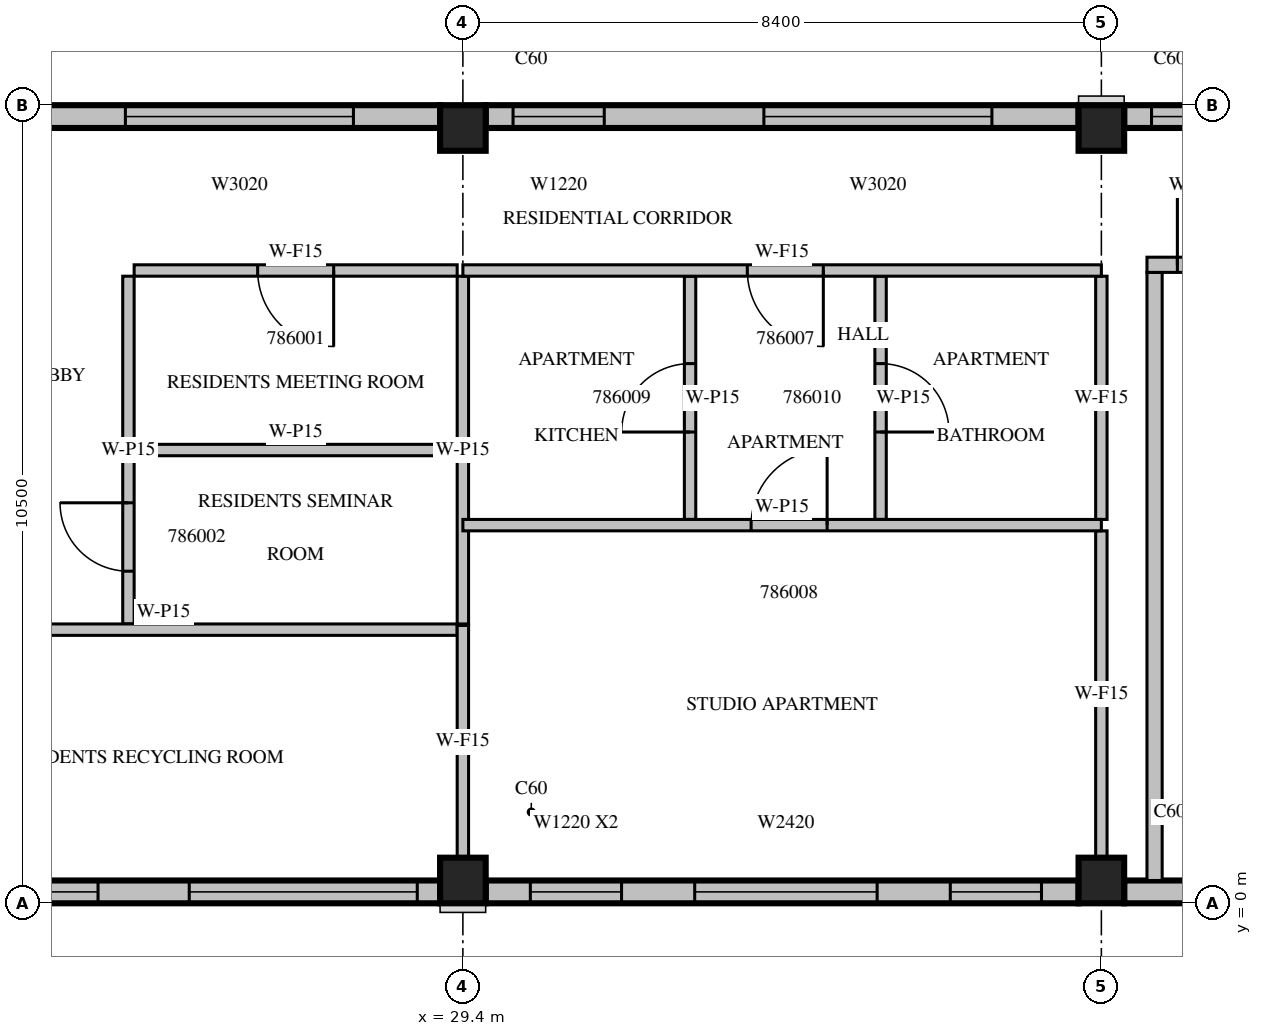
"""IFC4 building model, lengths in metres.
Left out: names, types, materials, properties, quantities, classifications, styles, units other than length and angle.
Written with IfcOpenShell. Run it as: python <this file> out.ifc"""

import sys

from ifc_helpers import new_model, si_unit, direction, frame, frame_2d, origin, origin_2d, place, context, subcontext, project, spatial, rectangle, extrude, source, transform, mapped, element, fill, save


model = new_model("IFC4")
c1 = context("Model", 3, precision=1e-05, world=origin(), true_north=direction((0.0, 1.0)))
c2 = subcontext(c1, "Body", "Model", "MODEL_VIEW")
j1 = project(units=[si_unit("LENGTHUNIT", "METRE"), si_unit("PLANEANGLEUNIT", "RADIAN")], contexts=[c1])
p1 = place(None, origin())
s1 = spatial("IfcSite", under=j1, at=p1, CompositionType="ELEMENT")
p2 = place(p1, origin())
s2 = spatial("IfcBuilding", under=s1, at=p2, CompositionType="ELEMENT")
p3 = place(p2, frame((0.0, 0.0, 361.5)))
s3 = spatial("IfcBuildingStorey", under=s2, at=p3, CompositionType="ELEMENT", Elevation=361.5)
m1 = source(origin(), c2, "Body", "SweptSolid", [
    extrude(rectangle(XDim=0.6, YDim=0.6, at=origin_2d()), origin(), (0.0, 0.0, 1.0), 3.5),
])
for number, where, z_axis, x_axis in (
    (1, (29.4, 0.3, 0.0), (0.0, 0.0, 1.0), (1.0, 0.0, 0.0)),
    (2, (37.8, 0.3, 0.0), (0.0, 0.0, 1.0), (1.0, 0.0, 0.0)),
    (3, (29.4, 10.2, 0.0), (0.0, 0.0, 1.0), (1.0, 0.0, 0.0)),
    (4, (37.8, 10.2, 0.0), (0.0, 0.0, 1.0), (1.0, 0.0, 0.0)),
):
    element("IfcColumn", number, at=place(p3, frame(where, z_axis=z_axis, x_axis=x_axis)), inside=s3, PredefinedType="COLUMN", context=c2, shape_type="MappedRepresentation", body=[
        mapped(m1, transform((0.0, 0.0, 0.0), scale=1.0)),
    ])
m2 = source(origin(), c2, "Body", "SweptSolid", [
    extrude(rectangle(XDim=7.8, YDim=0.3, at=frame_2d((3.9, 0.0))), origin(), (0.0, 0.0, 1.0), 3.1),
])
p4 = place(p3, frame((21.3, 0.15, 0.0), z_axis=(0.0, 0.0, 1.0), x_axis=(1.0, 0.0, 0.0)))
e5 = element("IfcWall", 5, at=p4, inside=s3, PredefinedType="STANDARD", context=c2, shape_type="MappedRepresentation", body=[
    mapped(m2, transform((0.0, 0.0, 0.0), scale=1.0)),
])
m3 = source(origin(), c2, "Body", "SweptSolid", [
    extrude(rectangle(XDim=3.0, YDim=2.0, at=frame_2d((1.5, 1.0))), frame((0.0, 0.16, 0.0), z_axis=(0.0, -1.0, 0.0), x_axis=(1.0, 0.0, 0.0)), (0.0, 0.0, 1.0), 0.32),
])
p5 = place(p4, frame((0.3, 0.0, 0.6)))
e6 = element("IfcOpeningElement", 6, at=p5, cuts=e5, PredefinedType="OPENING", context=c2, shape_type="MappedRepresentation", body=[
    mapped(m3, transform((0.0, 0.0, 0.0), scale=1.0)),
])
p6 = place(p4, frame((4.5, 0.0, 0.6)))
e7 = element("IfcOpeningElement", 7, at=p6, cuts=e5, PredefinedType="OPENING", context=c2, shape_type="MappedRepresentation", body=[
    mapped(m3, transform((0.0, 0.0, 0.0), scale=1.0)),
])
p7 = place(p3, frame((29.7, 0.15, 0.0), z_axis=(0.0, 0.0, 1.0), x_axis=(1.0, 0.0, 0.0)))
e8 = element("IfcWall", 8, at=p7, inside=s3, PredefinedType="STANDARD", context=c2, shape_type="MappedRepresentation", body=[
    mapped(m2, transform((0.0, 0.0, 0.0), scale=1.0)),
])
m4 = source(origin(), c2, "Body", "SweptSolid", [
    extrude(rectangle(XDim=1.2, YDim=2.0, at=frame_2d((0.6, 1.0))), frame((0.0, 0.16, 0.0), z_axis=(0.0, -1.0, 0.0), x_axis=(1.0, 0.0, 0.0)), (0.0, 0.0, 1.0), 0.32),
])
p8 = place(p7, frame((0.588, 0.0, 0.6)))
e9 = element("IfcOpeningElement", 9, at=p8, cuts=e8, PredefinedType="OPENING", context=c2, shape_type="MappedRepresentation", body=[
    mapped(m4, transform((0.0, 0.0, 0.0), scale=1.0)),
])
p9 = place(p7, frame((6.112, 0.0, 0.6)))
e10 = element("IfcOpeningElement", 10, at=p9, cuts=e8, PredefinedType="OPENING", context=c2, shape_type="MappedRepresentation", body=[
    mapped(m4, transform((0.0, 0.0, 0.0), scale=1.0)),
])
m5 = source(origin(), c2, "Body", "SweptSolid", [
    extrude(rectangle(XDim=2.4, YDim=2.0, at=frame_2d((1.2, 1.0))), frame((0.0, 0.16, 0.0), z_axis=(0.0, -1.0, 0.0), x_axis=(1.0, 0.0, 0.0)), (0.0, 0.0, 1.0), 0.32),
])
p10 = place(p7, frame((2.75, 0.0, 0.6)))
e11 = element("IfcOpeningElement", 11, at=p10, cuts=e8, PredefinedType="OPENING", context=c2, shape_type="MappedRepresentation", body=[
    mapped(m5, transform((0.0, 0.0, 0.0), scale=1.0)),
])
m6 = source(origin(), c2, "Body", "SweptSolid", [
    extrude(rectangle(XDim=2.1, YDim=0.3, at=frame_2d((1.05, 0.0))), origin(), (0.0, 0.0, 1.0), 3.1),
])
p11 = place(p3, frame((38.1, 0.15, 0.0), z_axis=(0.0, 0.0, 1.0), x_axis=(1.0, 0.0, 0.0)))
e12 = element("IfcWall", 12, at=p11, inside=s3, PredefinedType="STANDARD", context=c2, shape_type="MappedRepresentation", body=[
    mapped(m6, transform((0.0, 0.0, 0.0), scale=1.0)),
])
p12 = place(p3, frame((45.9, 10.35, 0.0), z_axis=(0.0, 0.0, 1.0), x_axis=(-1.0, 0.0, 0.0)))
e13 = element("IfcWall", 13, at=p12, inside=s3, PredefinedType="STANDARD", context=c2, shape_type="MappedRepresentation", body=[
    mapped(m2, transform((0.0, 0.0, 0.0), scale=1.0)),
])
p13 = place(p12, frame((1.14, 0.0, 0.6)))
e14 = element("IfcOpeningElement", 14, at=p13, cuts=e13, PredefinedType="OPENING", context=c2, shape_type="MappedRepresentation", body=[
    mapped(m3, transform((0.0, 0.0, 0.0), scale=1.0)),
])
p14 = place(p12, frame((6.24, 0.0, 0.6)))
e15 = element("IfcOpeningElement", 15, at=p14, cuts=e13, PredefinedType="OPENING", context=c2, shape_type="MappedRepresentation", body=[
    mapped(m4, transform((0.0, 0.0, 0.0), scale=1.0)),
])
p15 = place(p3, frame((37.5, 10.35, 0.0), z_axis=(0.0, 0.0, 1.0), x_axis=(-1.0, 0.0, 0.0)))
e16 = element("IfcWall", 16, at=p15, inside=s3, PredefinedType="STANDARD", context=c2, shape_type="MappedRepresentation", body=[
    mapped(m2, transform((0.0, 0.0, 0.0), scale=1.0)),
])
p16 = place(p15, frame((1.14, 0.0, 0.6)))
e17 = element("IfcOpeningElement", 17, at=p16, cuts=e16, PredefinedType="OPENING", context=c2, shape_type="MappedRepresentation", body=[
    mapped(m3, transform((0.0, 0.0, 0.0), scale=1.0)),
])
p17 = place(p15, frame((6.24, 0.0, 0.6)))
e18 = element("IfcOpeningElement", 18, at=p17, cuts=e16, PredefinedType="OPENING", context=c2, shape_type="MappedRepresentation", body=[
    mapped(m4, transform((0.0, 0.0, 0.0), scale=1.0)),
])
m7 = source(origin(), c2, "Body", "SweptSolid", [
    extrude(rectangle(XDim=7.5, YDim=0.3, at=frame_2d((3.75, 0.0))), origin(), (0.0, 0.0, 1.0), 3.1),
])
p18 = place(p3, frame((29.1, 10.35, 0.0), z_axis=(0.0, 0.0, 1.0), x_axis=(-1.0, 0.0, 0.0)))
e19 = element("IfcWall", 19, at=p18, inside=s3, PredefinedType="STANDARD", context=c2, shape_type="MappedRepresentation", body=[
    mapped(m7, transform((0.0, 0.0, 0.0), scale=1.0)),
])
p19 = place(p18, frame((1.14, 0.0, 0.6)))
e20 = element("IfcOpeningElement", 20, at=p19, cuts=e19, PredefinedType="OPENING", context=c2, shape_type="MappedRepresentation", body=[
    mapped(m3, transform((0.0, 0.0, 0.0), scale=1.0)),
])
m8 = source(origin(), c2, "Body", "SweptSolid", [
    extrude(rectangle(XDim=1.8, YDim=2.0, at=frame_2d((0.9, 1.0))), frame((0.0, 0.16, 0.0), z_axis=(0.0, -1.0, 0.0), x_axis=(1.0, 0.0, 0.0)), (0.0, 0.0, 1.0), 0.32),
])
p20 = place(p18, frame((5.52, 0.0, 0.6)))
e21 = element("IfcOpeningElement", 21, at=p20, cuts=e19, PredefinedType="OPENING", context=c2, shape_type="MappedRepresentation", body=[
    mapped(m8, transform((0.0, 0.0, 0.0), scale=1.0)),
])
m9 = source(origin(), c2, "Body", "SweptSolid", [
    extrude(rectangle(XDim=8.0, YDim=0.2, at=frame_2d((4.0, 0.0))), origin(), (0.0, 0.0, 1.0), 3.1),
])
p21 = place(p3, frame((38.5, 0.3, 0.0), z_axis=(0.0, 0.0, 1.0), x_axis=(0.0, 1.0, 0.0)))
e22 = element("IfcWall", 22, at=p21, inside=s3, PredefinedType="PARTITIONING", context=c2, shape_type="MappedRepresentation", body=[
    mapped(m9, transform((0.0, 0.0, 0.0), scale=1.0)),
])
m10 = source(origin(), c2, "Body", "SweptSolid", [
    extrude(rectangle(XDim=5.45, YDim=0.2, at=frame_2d((2.725, 0.0))), origin(), (0.0, 0.0, 1.0), 3.1),
])
p22 = place(p3, frame((38.4, 8.4, 0.0), z_axis=(0.0, 0.0, 1.0), x_axis=(1.0, 0.0, 0.0)))
e23 = element("IfcWall", 23, at=p22, inside=s3, PredefinedType="PARTITIONING", context=c2, shape_type="MappedRepresentation", body=[
    mapped(m10, transform((0.0, 0.0, 0.0), scale=1.0)),
])
m11 = source(origin(), c2, "Body", "SweptSolid", [
    extrude(rectangle(XDim=1.2, YDim=2.1, at=frame_2d((0.6, 1.05))), frame((0.0, 0.11, 0.0), z_axis=(0.0, -1.0, 0.0), x_axis=(1.0, 0.0, 0.0)), (0.0, 0.0, 1.0), 0.22),
])
p23 = place(p22, frame((0.4, 0.0, 0.0)))
e24 = element("IfcOpeningElement", 24, at=p23, cuts=e23, PredefinedType="OPENING", context=c2, shape_type="MappedRepresentation", body=[
    mapped(m11, transform((0.0, 0.0, 0.0), scale=1.0)),
])
m12 = source(origin(), c2, "Body", "SweptSolid", [
    extrude(rectangle(XDim=0.9, YDim=2.1, at=frame_2d((0.45, 1.05))), frame((0.0, 0.11, 0.0), z_axis=(0.0, -1.0, 0.0), x_axis=(1.0, 0.0, 0.0)), (0.0, 0.0, 1.0), 0.22),
])
p24 = place(p22, frame((3.25, 0.0, 0.0)))
e25 = element("IfcOpeningElement", 25, at=p24, cuts=e23, PredefinedType="OPENING", context=c2, shape_type="MappedRepresentation", body=[
    mapped(m12, transform((0.0, 0.0, 0.0), scale=1.0)),
])
m13 = source(origin(), c2, "Body", "SweptSolid", [
    extrude(rectangle(XDim=4.575, YDim=0.15, at=frame_2d((2.288, 0.0))), origin(), (0.0, 0.0, 1.0), 3.1),
])
p25 = place(p3, frame((25.0, 8.25, 0.0), z_axis=(0.0, 0.0, 1.0), x_axis=(0.0, -1.0, 0.0)))
e26 = element("IfcWall", 26, at=p25, inside=s3, PredefinedType="PARTITIONING", context=c2, shape_type="MappedRepresentation", body=[
    mapped(m13, transform((0.0, 0.0, 0.0), scale=1.0)),
])
m14 = source(origin(), c2, "Body", "SweptSolid", [
    extrude(rectangle(XDim=0.9, YDim=2.1, at=frame_2d((0.45, 1.05))), frame((0.0, 0.085, 0.0), z_axis=(0.0, -1.0, 0.0), x_axis=(1.0, 0.0, 0.0)), (0.0, 0.0, 1.0), 0.17),
])
p26 = place(p25, frame((2.981, 0.0, 0.0)))
e27 = element("IfcOpeningElement", 27, at=p26, cuts=e26, PredefinedType="OPENING", context=c2, shape_type="MappedRepresentation", body=[
    mapped(m14, transform((0.0, 0.0, 0.0), scale=1.0)),
])
p27 = place(p3, frame((29.4, 3.675, 0.0), z_axis=(0.0, 0.0, 1.0), x_axis=(0.0, 1.0, 0.0)))
e28 = element("IfcWall", 28, at=p27, inside=s3, PredefinedType="PARTITIONING", context=c2, shape_type="MappedRepresentation", body=[
    mapped(m13, transform((0.0, 0.0, 0.0), scale=1.0)),
])
m15 = source(origin(), c2, "Body", "SweptSolid", [
    extrude(rectangle(XDim=4.25, YDim=0.15, at=frame_2d((2.125, 0.0))), origin(), (0.0, 0.0, 1.0), 3.1),
])
p28 = place(p3, frame((29.325, 8.325, 0.0), z_axis=(0.0, 0.0, 1.0), x_axis=(-1.0, 0.0, 0.0)))
e29 = element("IfcWall", 29, at=p28, inside=s3, PredefinedType="PARTITIONING", context=c2, shape_type="MappedRepresentation", body=[
    mapped(m15, transform((0.0, 0.0, 0.0), scale=1.0)),
])
m16 = source(origin(), c2, "Body", "SweptSolid", [
    extrude(rectangle(XDim=1.0, YDim=2.1, at=frame_2d((0.5, 1.05))), frame((0.0, 0.085, 0.0), z_axis=(0.0, -1.0, 0.0), x_axis=(1.0, 0.0, 0.0)), (0.0, 0.0, 1.0), 0.17),
])
p29 = place(p28, frame((1.625, 0.0, 0.0)))
e30 = element("IfcOpeningElement", 30, at=p29, cuts=e29, PredefinedType="OPENING", context=c2, shape_type="MappedRepresentation", body=[
    mapped(m16, transform((0.0, 0.0, 0.0), scale=1.0)),
])
p30 = place(p3, frame((29.325, 5.963, 0.0), z_axis=(0.0, 0.0, 1.0), x_axis=(-1.0, 0.0, 0.0)))
e31 = element("IfcWall", 31, at=p30, inside=s3, PredefinedType="PARTITIONING", context=c2, shape_type="MappedRepresentation", body=[
    mapped(m15, transform((0.0, 0.0, 0.0), scale=1.0)),
])
m17 = source(origin(), c2, "Body", "SweptSolid", [
    extrude(rectangle(XDim=7.725, YDim=0.15, at=frame_2d((3.862, 0.0))), origin(), (0.0, 0.0, 1.0), 3.1),
])
p31 = place(p3, frame((21.6, 3.6, 0.0), z_axis=(0.0, 0.0, 1.0), x_axis=(1.0, 0.0, 0.0)))
e32 = element("IfcWall", 32, at=p31, inside=s3, PredefinedType="PARTITIONING", context=c2, shape_type="MappedRepresentation", body=[
    mapped(m17, transform((0.0, 0.0, 0.0), scale=1.0)),
])
m18 = source(origin(), c2, "Body", "SweptSolid", [
    extrude(rectangle(XDim=1.2, YDim=2.1, at=frame_2d((0.6, 1.05))), frame((0.0, 0.085, 0.0), z_axis=(0.0, -1.0, 0.0), x_axis=(1.0, 0.0, 0.0)), (0.0, 0.0, 1.0), 0.17),
])
p32 = place(p31, frame((1.1, 0.0, 0.0)))
e33 = element("IfcOpeningElement", 33, at=p32, cuts=e32, PredefinedType="OPENING", context=c2, shape_type="MappedRepresentation", body=[
    mapped(m18, transform((0.0, 0.0, 0.0), scale=1.0)),
])
m19 = source(origin(), c2, "Body", "SweptSolid", [
    extrude(rectangle(XDim=3.2, YDim=0.15, at=frame_2d((1.6, 0.0))), origin(), (0.0, 0.0, 1.0), 3.1),
])
p33 = place(p3, frame((32.389, 5.05, 0.0), z_axis=(0.0, 0.0, 1.0), x_axis=(0.0, 1.0, 0.0)))
e34 = element("IfcWall", 34, at=p33, inside=s3, PredefinedType="PARTITIONING", context=c2, shape_type="MappedRepresentation", body=[
    mapped(m19, transform((0.0, 0.0, 0.0), scale=1.0)),
])
p34 = place(p33, frame((1.15, 0.0, 0.0)))
e35 = element("IfcOpeningElement", 35, at=p34, cuts=e34, PredefinedType="OPENING", context=c2, shape_type="MappedRepresentation", body=[
    mapped(m14, transform((0.0, 0.0, 0.0), scale=1.0)),
])
p35 = place(p3, frame((34.895, 5.05, 0.0), z_axis=(0.0, 0.0, 1.0), x_axis=(0.0, 1.0, 0.0)))
e36 = element("IfcWall", 36, at=p35, inside=s3, PredefinedType="PARTITIONING", context=c2, shape_type="MappedRepresentation", body=[
    mapped(m19, transform((0.0, 0.0, 0.0), scale=1.0)),
])
p36 = place(p35, frame((1.15, 0.0, 0.0)))
e37 = element("IfcOpeningElement", 37, at=p36, cuts=e36, PredefinedType="OPENING", context=c2, shape_type="MappedRepresentation", body=[
    mapped(m14, transform((0.0, 0.0, 0.0), scale=1.0)),
])
m20 = source(origin(), c2, "Body", "SweptSolid", [
    extrude(rectangle(XDim=3.056, YDim=0.15, at=frame_2d((1.528, 0.0))), origin(), (0.0, 0.0, 1.0), 3.1),
])
p37 = place(p3, frame((29.4, 0.599, 0.0), z_axis=(0.0, 0.0, 1.0), x_axis=(0.0, 1.0, 0.0)))
e38 = element("IfcWall", 38, at=p37, inside=s3, PredefinedType="PARTITIONING", context=c2, shape_type="MappedRepresentation", body=[
    mapped(m20, transform((0.0, 0.0, 0.0), scale=1.0)),
])
m21 = source(origin(), c2, "Body", "SweptSolid", [
    extrude(rectangle(XDim=4.301, YDim=0.15, at=frame_2d((2.151, 0.0))), origin(), (0.0, 0.0, 1.0), 3.1),
])
p38 = place(p3, frame((37.8, 0.599, 0.0), z_axis=(0.0, 0.0, 1.0), x_axis=(0.0, 1.0, 0.0)))
e39 = element("IfcWall", 39, at=p38, inside=s3, PredefinedType="PARTITIONING", context=c2, shape_type="MappedRepresentation", body=[
    mapped(m21, transform((0.0, 0.0, 0.0), scale=1.0)),
])
p39 = place(p3, frame((37.8, 5.05, 0.0), z_axis=(0.0, 0.0, 1.0), x_axis=(0.0, 1.0, 0.0)))
e40 = element("IfcWall", 40, at=p39, inside=s3, PredefinedType="PARTITIONING", context=c2, shape_type="MappedRepresentation", body=[
    mapped(m19, transform((0.0, 0.0, 0.0), scale=1.0)),
])
m22 = source(origin(), c2, "Body", "SweptSolid", [
    extrude(rectangle(XDim=8.4, YDim=0.15, at=frame_2d((4.2, 0.0))), origin(), (0.0, 0.0, 1.0), 3.1),
])
p40 = place(p3, frame((37.8, 4.975, 0.0), z_axis=(0.0, 0.0, 1.0), x_axis=(-1.0, 0.0, 0.0)))
e41 = element("IfcWall", 41, at=p40, inside=s3, PredefinedType="PARTITIONING", context=c2, shape_type="MappedRepresentation", body=[
    mapped(m22, transform((0.0, 0.0, 0.0), scale=1.0)),
])
p41 = place(p40, frame((3.608, 0.0, 0.0)))
e42 = element("IfcOpeningElement", 42, at=p41, cuts=e41, PredefinedType="OPENING", context=c2, shape_type="MappedRepresentation", body=[
    mapped(m16, transform((0.0, 0.0, 0.0), scale=1.0)),
])
p42 = place(p3, frame((37.8, 8.325, 0.0), z_axis=(0.0, 0.0, 1.0), x_axis=(-1.0, 0.0, 0.0)))
e43 = element("IfcWall", 43, at=p42, inside=s3, PredefinedType="PARTITIONING", context=c2, shape_type="MappedRepresentation", body=[
    mapped(m22, transform((0.0, 0.0, 0.0), scale=1.0)),
])
p43 = place(p42, frame((3.658, 0.0, 0.0)))
e44 = element("IfcOpeningElement", 44, at=p43, cuts=e43, PredefinedType="OPENING", context=c2, shape_type="MappedRepresentation", body=[
    mapped(m16, transform((0.0, 0.0, 0.0), scale=1.0)),
])
m23 = source(origin(), c2, "Body", "SweptSolid", [
    extrude(rectangle(XDim=3.0, YDim=2.0, at=frame_2d((1.5, 1.0))), frame((0.0, 0.03, 0.0), z_axis=(0.0, -1.0, 0.0), x_axis=(1.0, 0.0, 0.0)), (0.0, 0.0, 1.0), 0.06),
])
p44 = place(p5, origin())
e45 = element("IfcWindow", 45, at=p44, inside=s3, PartitioningType="SINGLE_PANEL", PredefinedType="WINDOW", context=c2, shape_type="MappedRepresentation", body=[
    mapped(m23, transform((0.0, 0.0, 0.0), scale=1.0)),
])
fill(e6, e45)
p45 = place(p6, origin())
e46 = element("IfcWindow", 46, at=p45, inside=s3, PartitioningType="SINGLE_PANEL", PredefinedType="WINDOW", context=c2, shape_type="MappedRepresentation", body=[
    mapped(m23, transform((0.0, 0.0, 0.0), scale=1.0)),
])
fill(e7, e46)
m24 = source(origin(), c2, "Body", "SweptSolid", [
    extrude(rectangle(XDim=1.2, YDim=2.0, at=frame_2d((0.6, 1.0))), frame((0.0, 0.03, 0.0), z_axis=(0.0, -1.0, 0.0), x_axis=(1.0, 0.0, 0.0)), (0.0, 0.0, 1.0), 0.06),
])
p46 = place(p8, origin())
e47 = element("IfcWindow", 47, at=p46, inside=s3, PartitioningType="SINGLE_PANEL", PredefinedType="WINDOW", context=c2, shape_type="MappedRepresentation", body=[
    mapped(m24, transform((0.0, 0.0, 0.0), scale=1.0)),
])
fill(e9, e47)
p47 = place(p9, origin())
e48 = element("IfcWindow", 48, at=p47, inside=s3, PartitioningType="SINGLE_PANEL", PredefinedType="WINDOW", context=c2, shape_type="MappedRepresentation", body=[
    mapped(m24, transform((0.0, 0.0, 0.0), scale=1.0)),
])
fill(e10, e48)
m25 = source(origin(), c2, "Body", "SweptSolid", [
    extrude(rectangle(XDim=2.4, YDim=2.0, at=frame_2d((1.2, 1.0))), frame((0.0, 0.03, 0.0), z_axis=(0.0, -1.0, 0.0), x_axis=(1.0, 0.0, 0.0)), (0.0, 0.0, 1.0), 0.06),
])
p48 = place(p10, origin())
e49 = element("IfcWindow", 49, at=p48, inside=s3, PartitioningType="SINGLE_PANEL", PredefinedType="WINDOW", context=c2, shape_type="MappedRepresentation", body=[
    mapped(m25, transform((0.0, 0.0, 0.0), scale=1.0)),
])
fill(e11, e49)
p49 = place(p14, origin())
e50 = element("IfcWindow", 50, at=p49, inside=s3, PartitioningType="SINGLE_PANEL", PredefinedType="WINDOW", context=c2, shape_type="MappedRepresentation", body=[
    mapped(m24, transform((0.0, 0.0, 0.0), scale=1.0)),
])
fill(e15, e50)
p50 = place(p16, origin())
e51 = element("IfcWindow", 51, at=p50, inside=s3, PartitioningType="SINGLE_PANEL", PredefinedType="WINDOW", context=c2, shape_type="MappedRepresentation", body=[
    mapped(m23, transform((0.0, 0.0, 0.0), scale=1.0)),
])
fill(e17, e51)
p51 = place(p17, origin())
e52 = element("IfcWindow", 52, at=p51, inside=s3, PartitioningType="SINGLE_PANEL", PredefinedType="WINDOW", context=c2, shape_type="MappedRepresentation", body=[
    mapped(m24, transform((0.0, 0.0, 0.0), scale=1.0)),
])
fill(e18, e52)
p52 = place(p19, origin())
e53 = element("IfcWindow", 53, at=p52, inside=s3, PartitioningType="SINGLE_PANEL", PredefinedType="WINDOW", context=c2, shape_type="MappedRepresentation", body=[
    mapped(m23, transform((0.0, 0.0, 0.0), scale=1.0)),
])
fill(e20, e53)
m26 = source(origin(), c2, "Body", "SweptSolid", [
    extrude(rectangle(XDim=1.2, YDim=2.1, at=frame_2d((0.6, 1.05))), frame((0.0, 0.025, 0.0), z_axis=(0.0, -1.0, 0.0), x_axis=(1.0, 0.0, 0.0)), (0.0, 0.0, 1.0), 0.05),
])
p53 = place(p23, origin())
e54 = element("IfcDoor", 54, at=p53, inside=s3, OperationType="SINGLE_SWING_LEFT", PredefinedType="DOOR", context=c2, shape_type="MappedRepresentation", body=[
    mapped(m26, transform((0.0, 0.0, 0.0), scale=1.0)),
])
fill(e24, e54)
m27 = source(origin(), c2, "Body", "SweptSolid", [
    extrude(rectangle(XDim=1.0, YDim=2.1, at=frame_2d((0.5, 1.05))), frame((0.0, 0.025, 0.0), z_axis=(0.0, -1.0, 0.0), x_axis=(1.0, 0.0, 0.0)), (0.0, 0.0, 1.0), 0.05),
])
p54 = place(p29, origin())
e55 = element("IfcDoor", 55, at=p54, inside=s3, OperationType="SINGLE_SWING_LEFT", PredefinedType="DOOR", context=c2, shape_type="MappedRepresentation", body=[
    mapped(m27, transform((0.0, 0.0, 0.0), scale=1.0)),
])
fill(e30, e55)
m28 = source(origin(), c2, "Body", "SweptSolid", [
    extrude(rectangle(XDim=0.9, YDim=2.1, at=frame_2d((0.45, 1.05))), frame((0.0, 0.025, 0.0), z_axis=(0.0, -1.0, 0.0), x_axis=(1.0, 0.0, 0.0)), (0.0, 0.0, 1.0), 0.05),
])
p55 = place(p26, origin())
e56 = element("IfcDoor", 56, at=p55, inside=s3, OperationType="SINGLE_SWING_RIGHT", PredefinedType="DOOR", context=c2, shape_type="MappedRepresentation", body=[
    mapped(m28, transform((0.0, 0.0, 0.0), scale=1.0)),
])
fill(e27, e56)
p56 = place(p43, origin())
e57 = element("IfcDoor", 57, at=p56, inside=s3, OperationType="SINGLE_SWING_LEFT", PredefinedType="DOOR", context=c2, shape_type="MappedRepresentation", body=[
    mapped(m27, transform((0.0, 0.0, 0.0), scale=1.0)),
])
fill(e44, e57)
p57 = place(p41, origin())
e58 = element("IfcDoor", 58, at=p57, inside=s3, OperationType="SINGLE_SWING_RIGHT", PredefinedType="DOOR", context=c2, shape_type="MappedRepresentation", body=[
    mapped(m27, transform((0.0, 0.0, 0.0), scale=1.0)),
])
fill(e42, e58)
p58 = place(p34, origin())
e59 = element("IfcDoor", 59, at=p58, inside=s3, OperationType="SINGLE_SWING_LEFT", PredefinedType="DOOR", context=c2, shape_type="MappedRepresentation", body=[
    mapped(m28, transform((0.0, 0.0, 0.0), scale=1.0)),
])
fill(e35, e59)
p59 = place(p36, origin())
e60 = element("IfcDoor", 60, at=p59, inside=s3, OperationType="SINGLE_SWING_RIGHT", PredefinedType="DOOR", context=c2, shape_type="MappedRepresentation", body=[
    mapped(m28, transform((0.0, 0.0, 0.0), scale=1.0)),
])
fill(e37, e60)
save(model, sys.argv[1])
